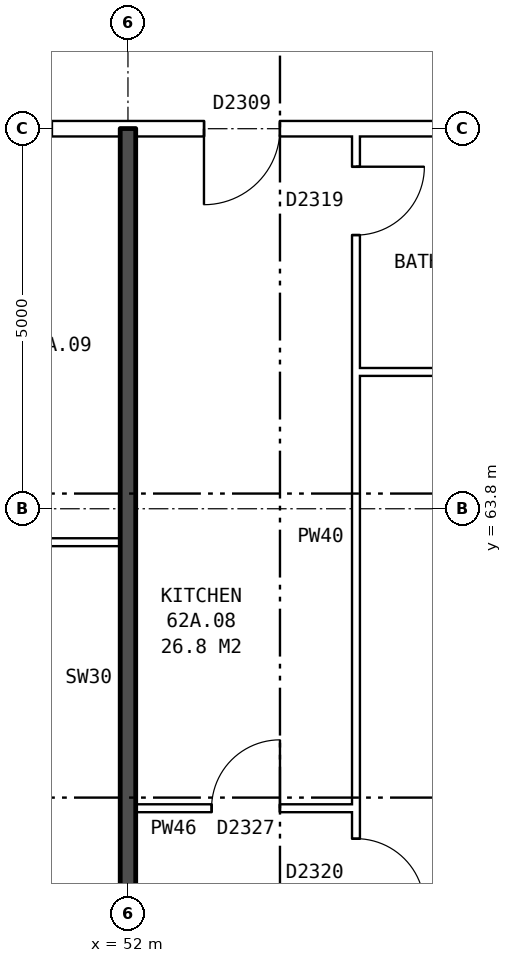
"""IFC4 building model, lengths in metres.
Left out: names, types, materials, properties, quantities, classifications, styles, units other than length and angle.
Written with IfcOpenShell. Run it as: python <this file> out.ifc"""

import sys

from ifc_helpers import new_model, si_unit, direction, frame, frame_2d, origin, place, context, subcontext, project, spatial, rectangle, extrude, element, fill, save


model = new_model("IFC4")
c1 = context("Model", 3, precision=1e-05, world=origin(), true_north=direction((0.0, 1.0)))
c2 = subcontext(c1, "Body", "Model", "MODEL_VIEW")
j1 = project(units=[si_unit("LENGTHUNIT", "METRE"), si_unit("PLANEANGLEUNIT", "RADIAN")], contexts=[c1])
p1 = place(None, origin())
s1 = spatial("IfcSite", under=j1, at=p1, CompositionType="ELEMENT")
p2 = place(p1, origin())
s2 = spatial("IfcBuilding", under=s1, at=p2, CompositionType="ELEMENT")
p3 = place(p2, frame((0.0, 0.0, 221.4)))
s3 = spatial("IfcBuildingStorey", under=s2, at=p3, CompositionType="ELEMENT", Elevation=221.4)
p4 = place(p3, frame((52.1, 59.86, 0.0), z_axis=(0.0, 0.0, 1.0), x_axis=(1.0, 0.0, 0.0)))
e1 = element("IfcWall", 1, at=p4, inside=s3, PredefinedType="PARTITIONING", context=c2, shape_type="SweptSolid", body=[
    extrude(rectangle(XDim=2.9, YDim=0.1, at=frame_2d((1.45, 0.0))), origin(), (0.0, 0.0, 1.0), 2.85),
])
p5 = place(p4, frame((1.0, 0.0, 0.0)))
e2 = element("IfcOpeningElement", 2, at=p5, cuts=e1, PredefinedType="OPENING", context=c2, shape_type="SweptSolid", body=[
    extrude(rectangle(XDim=0.9, YDim=2.1, at=frame_2d((0.45, 1.05))), frame((0.0, 0.06, 0.0), z_axis=(0.0, -1.0, 0.0), x_axis=(1.0, 0.0, 0.0)), (0.0, 0.0, 1.0), 0.12),
])
p6 = place(p3, frame((49.0, 63.36, 0.0), z_axis=(0.0, 0.0, 1.0), x_axis=(1.0, 0.0, 0.0)))
e3 = element("IfcWall", 3, at=p6, inside=s3, PredefinedType="PARTITIONING", context=c2, shape_type="SweptSolid", body=[
    extrude(rectangle(XDim=2.9, YDim=0.1, at=frame_2d((1.45, 0.0))), origin(), (0.0, 0.0, 1.0), 2.85),
])
p7 = place(p6, frame((1.0, 0.0, 0.0)))
e4 = element("IfcOpeningElement", 4, at=p7, cuts=e3, PredefinedType="OPENING", context=c2, shape_type="SweptSolid", body=[
    extrude(rectangle(XDim=0.9, YDim=2.1, at=frame_2d((0.45, 1.05))), frame((0.0, 0.06, 0.0), z_axis=(0.0, -1.0, 0.0), x_axis=(1.0, 0.0, 0.0)), (0.0, 0.0, 1.0), 0.12),
])
p8 = place(p3, frame((55.0, 65.6, 0.0), z_axis=(0.0, 0.0, 1.0), x_axis=(1.0, 0.0, 0.0)))
e5 = element("IfcWall", 5, at=p8, inside=s3, PredefinedType="PARTITIONING", context=c2, shape_type="SweptSolid", body=[
    extrude(rectangle(XDim=2.9, YDim=0.1, at=frame_2d((1.45, 0.0))), origin(), (0.0, 0.0, 1.0), 2.85),
])
p9 = place(p3, frame((44.36, 68.8, 0.0), z_axis=(0.0, 0.0, 1.0), x_axis=(1.0, 0.0, 0.0)))
e6 = element("IfcWall", 6, at=p9, inside=s3, PredefinedType="PARTITIONING", context=c2, shape_type="SweptSolid", body=[
    extrude(rectangle(XDim=19.28, YDim=0.2, at=frame_2d((9.64, 0.0))), origin(), (0.0, 0.0, 1.0), 2.85),
])
p10 = place(p9, frame((14.64, 0.0, 0.0)))
e7 = element("IfcOpeningElement", 7, at=p10, cuts=e6, PredefinedType="OPENING", context=c2, shape_type="SweptSolid", body=[
    extrude(rectangle(XDim=1.0, YDim=2.1, at=frame_2d((0.5, 1.05))), frame((0.0, 0.11, 0.0), z_axis=(0.0, -1.0, 0.0), x_axis=(1.0, 0.0, 0.0)), (0.0, 0.0, 1.0), 0.22),
])
p11 = place(p9, frame((8.64, 0.0, 0.0)))
e8 = element("IfcOpeningElement", 8, at=p11, cuts=e6, PredefinedType="OPENING", context=c2, shape_type="SweptSolid", body=[
    extrude(rectangle(XDim=1.0, YDim=2.1, at=frame_2d((0.5, 1.05))), frame((0.0, 0.11, 0.0), z_axis=(0.0, -1.0, 0.0), x_axis=(1.0, 0.0, 0.0)), (0.0, 0.0, 1.0), 0.22),
])
p12 = place(p9, frame((5.64, 0.0, 0.0)))
e9 = element("IfcOpeningElement", 9, at=p12, cuts=e6, PredefinedType="OPENING", context=c2, shape_type="SweptSolid", body=[
    extrude(rectangle(XDim=1.0, YDim=2.1, at=frame_2d((0.5, 1.05))), frame((0.0, 0.11, 0.0), z_axis=(0.0, -1.0, 0.0), x_axis=(1.0, 0.0, 0.0)), (0.0, 0.0, 1.0), 0.22),
])
p13 = place(p3, frame((52.0, 54.36, 0.0), z_axis=(0.0, 0.0, 1.0), x_axis=(0.0, 1.0, 0.0)))
e10 = element("IfcWall", 10, at=p13, inside=s3, PredefinedType="SOLIDWALL", context=c2, shape_type="SweptSolid", body=[
    extrude(rectangle(XDim=14.44, YDim=0.2, at=frame_2d((7.22, 0.0))), origin(), (0.0, 0.0, 1.0), 2.85),
])
p14 = place(p3, frame((55.0, 54.36, 0.0), z_axis=(0.0, 0.0, 1.0), x_axis=(0.0, 1.0, 0.0)))
e11 = element("IfcWall", 11, at=p14, inside=s3, PredefinedType="PARTITIONING", context=c2, shape_type="SweptSolid", body=[
    extrude(rectangle(XDim=14.34, YDim=0.1, at=frame_2d((7.17, 0.0))), origin(), (0.0, 0.0, 1.0), 2.85),
])
p15 = place(p14, frame((4.2, 0.0, 0.0)))
e12 = element("IfcOpeningElement", 12, at=p15, cuts=e11, PredefinedType="OPENING", context=c2, shape_type="SweptSolid", body=[
    extrude(rectangle(XDim=0.9, YDim=2.1, at=frame_2d((0.45, 1.05))), frame((0.0, 0.06, 0.0), z_axis=(0.0, -1.0, 0.0), x_axis=(1.0, 0.0, 0.0)), (0.0, 0.0, 1.0), 0.12),
])
p16 = place(p14, frame((13.04, 0.0, 0.0)))
e13 = element("IfcOpeningElement", 13, at=p16, cuts=e11, PredefinedType="OPENING", context=c2, shape_type="SweptSolid", body=[
    extrude(rectangle(XDim=0.9, YDim=2.1, at=frame_2d((0.45, 1.05))), frame((0.0, 0.06, 0.0), z_axis=(0.0, -1.0, 0.0), x_axis=(1.0, 0.0, 0.0)), (0.0, 0.0, 1.0), 0.12),
])
p17 = place(p15, frame((0.9, 0.0, 0.0), z_axis=(0.0, 0.0, 1.0), x_axis=(-1.0, 0.0, 0.0)))
e14 = element("IfcDoor", 14, at=p17, inside=s3, OperationType="SINGLE_SWING_RIGHT", PredefinedType="DOOR", context=c2, shape_type="SweptSolid", body=[
    extrude(rectangle(XDim=0.9, YDim=2.1, at=frame_2d((0.45, 1.05))), frame((0.0, 0.025, 0.0), z_axis=(0.0, -1.0, 0.0), x_axis=(1.0, 0.0, 0.0)), (0.0, 0.0, 1.0), 0.05),
])
fill(e12, e14)
p18 = place(p11, frame((1.0, 0.0, 0.0), z_axis=(0.0, 0.0, 1.0), x_axis=(-1.0, 0.0, 0.0)))
e15 = element("IfcDoor", 15, at=p18, inside=s3, OperationType="SINGLE_SWING_RIGHT", PredefinedType="DOOR", context=c2, shape_type="SweptSolid", body=[
    extrude(rectangle(XDim=1.0, YDim=2.1, at=frame_2d((0.5, 1.05))), frame((0.0, 0.025, 0.0), z_axis=(0.0, -1.0, 0.0), x_axis=(1.0, 0.0, 0.0)), (0.0, 0.0, 1.0), 0.05),
])
fill(e8, e15)
p19 = place(p5, origin())
e16 = element("IfcDoor", 16, at=p19, inside=s3, OperationType="SINGLE_SWING_RIGHT", PredefinedType="DOOR", context=c2, shape_type="SweptSolid", body=[
    extrude(rectangle(XDim=0.9, YDim=2.1, at=frame_2d((0.45, 1.05))), frame((0.0, 0.025, 0.0), z_axis=(0.0, -1.0, 0.0), x_axis=(1.0, 0.0, 0.0)), (0.0, 0.0, 1.0), 0.05),
])
fill(e2, e16)
p20 = place(p16, frame((0.9, 0.0, 0.0), z_axis=(0.0, 0.0, 1.0), x_axis=(-1.0, 0.0, 0.0)))
e17 = element("IfcDoor", 17, at=p20, inside=s3, OperationType="SINGLE_SWING_LEFT", PredefinedType="DOOR", context=c2, shape_type="SweptSolid", body=[
    extrude(rectangle(XDim=0.9, YDim=2.1, at=frame_2d((0.45, 1.05))), frame((0.0, 0.025, 0.0), z_axis=(0.0, -1.0, 0.0), x_axis=(1.0, 0.0, 0.0)), (0.0, 0.0, 1.0), 0.05),
])
fill(e13, e17)
save(model, sys.argv[1])
